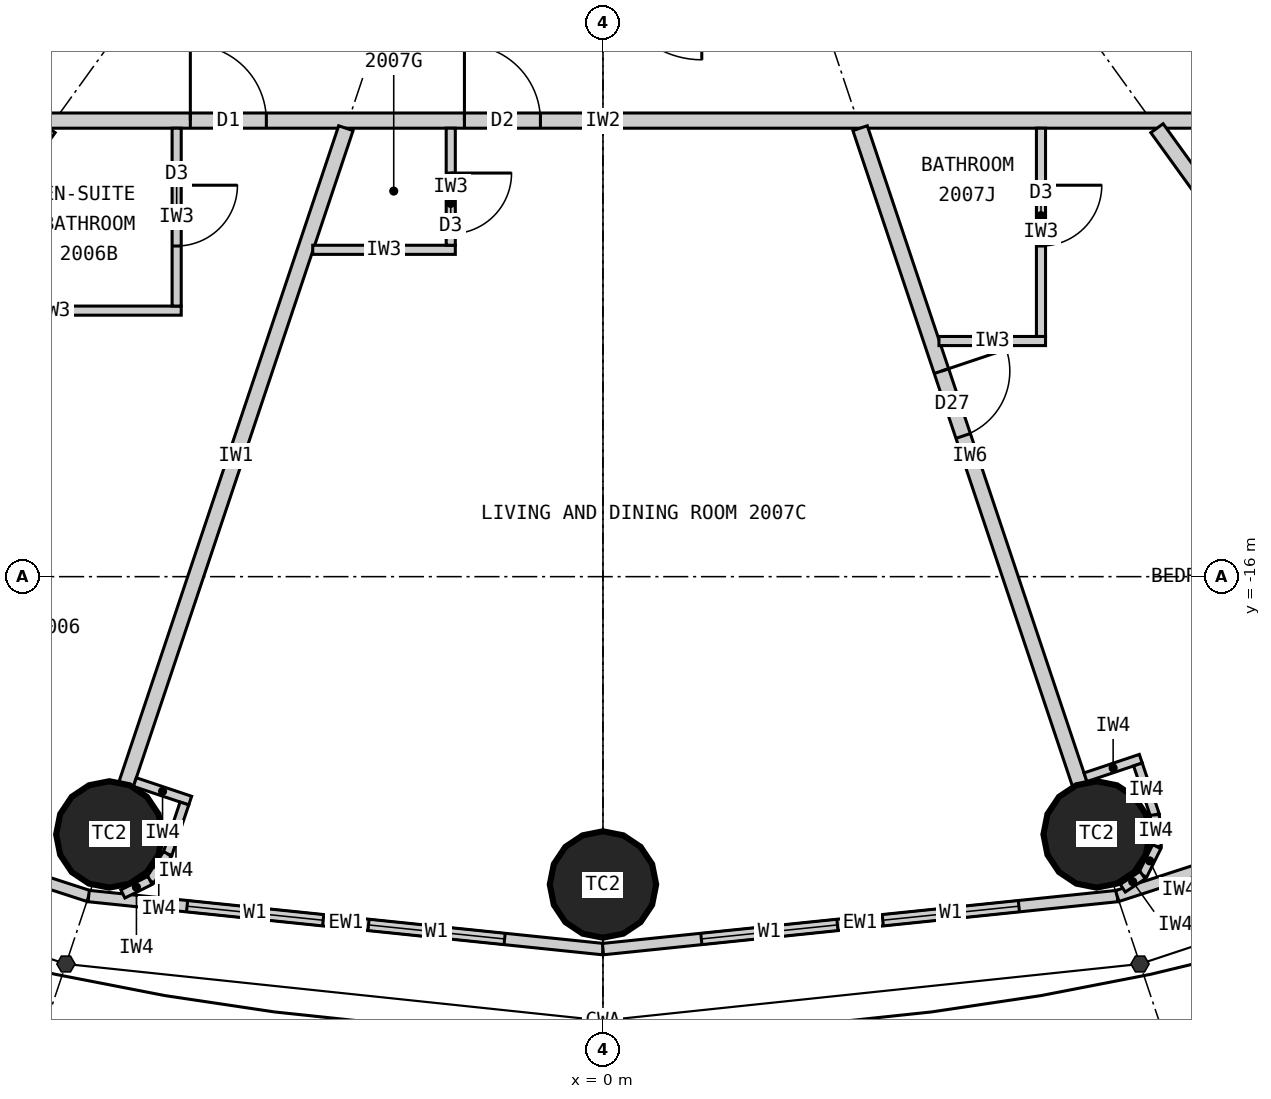
"""IFC4 building model, lengths in metres.
Left out: names, types, materials, properties, quantities, classifications, styles, units other than length and angle.
Written with IfcOpenShell. Run it as: python <this file> out.ifc"""

import sys

from ifc_helpers import new_model, si_unit, direction, frame, frame_2d, origin, origin_2d, place, context, subcontext, project, spatial, rectangle, circle, extrude, element, fill, save


model = new_model("IFC4")
c1 = context("Model", 3, precision=1e-05, world=origin(), true_north=direction((0.0, 1.0)))
c2 = subcontext(c1, "Body", "Model", "MODEL_VIEW")
j1 = project(units=[si_unit("LENGTHUNIT", "METRE"), si_unit("PLANEANGLEUNIT", "RADIAN")], contexts=[c1])
p1 = place(None, origin())
s1 = spatial("IfcSite", under=j1, at=p1, CompositionType="ELEMENT")
p2 = place(p1, origin())
s2 = spatial("IfcBuilding", under=s1, at=p2, CompositionType="ELEMENT")
p3 = place(p2, frame((0.0, 0.0, 80.4)))
s3 = spatial("IfcBuildingStorey", under=s2, at=p3, CompositionType="ELEMENT", Elevation=80.4)
for number, where, z_axis, x_axis in (
    (1, (-6.495, -19.391, 0.0), (0.0, 0.0, 1.0), (1.0, 0.0, 0.0)),
    (2, (0.0, -20.05, 0.0), (0.0, 0.0, 1.0), (1.0, 0.0, 0.0)),
    (3, (6.495, -19.391, 0.0), (0.0, 0.0, 1.0), (1.0, 0.0, 0.0)),
):
    element("IfcColumn", number, at=place(p3, frame(where, z_axis=z_axis, x_axis=x_axis)), inside=s3, PredefinedType="COLUMN", context=c2, shape_type="SweptSolid", body=[
        extrude(circle(Radius=0.7, at=origin_2d()), origin(), (0.0, 0.0, 1.0), 3.3),
    ])
p4 = place(p3, frame((-13.096, -18.147, 0.0), z_axis=(0.0, 0.0, 1.0), x_axis=(0.951137534625, -0.308767534285, 0.0)))
e4 = element("IfcWall", 4, at=p4, inside=s3, PredefinedType="ELEMENTEDWALL", context=c2, shape_type="SweptSolid", body=[
    extrude(rectangle(XDim=6.655, YDim=0.15, at=frame_2d((3.328, 0.0))), origin(), (0.0, 0.0, 1.0), 3.12),
])
p5 = place(p4, frame((1.228, 0.0, 0.9)))
e5 = element("IfcOpeningElement", 5, at=p5, cuts=e4, PredefinedType="OPENING", context=c2, shape_type="SweptSolid", body=[
    extrude(rectangle(XDim=1.8, YDim=1.9, at=frame_2d((0.9, 0.95))), frame((0.0, 0.085, 0.0), z_axis=(0.0, -1.0, 0.0), x_axis=(1.0, 0.0, 0.0)), (0.0, 0.0, 1.0), 0.17),
])
p6 = place(p4, frame((3.628, 0.0, 0.9)))
e6 = element("IfcOpeningElement", 6, at=p6, cuts=e4, PredefinedType="OPENING", context=c2, shape_type="SweptSolid", body=[
    extrude(rectangle(XDim=1.8, YDim=1.9, at=frame_2d((0.9, 0.95))), frame((0.0, 0.085, 0.0), z_axis=(0.0, -1.0, 0.0), x_axis=(1.0, 0.0, 0.0)), (0.0, 0.0, 1.0), 0.17),
])
p7 = place(p3, frame((-6.766, -20.202, 0.0), z_axis=(0.0, 0.0, 1.0), x_axis=(0.994721394369, -0.102612609291, 0.0)))
e7 = element("IfcWall", 7, at=p7, inside=s3, PredefinedType="ELEMENTEDWALL", context=c2, shape_type="SweptSolid", body=[
    extrude(rectangle(XDim=6.802, YDim=0.15, at=frame_2d((3.401, 0.0))), origin(), (0.0, 0.0, 1.0), 3.12),
])
p8 = place(p7, frame((1.301, 0.0, 0.9)))
e8 = element("IfcOpeningElement", 8, at=p8, cuts=e7, PredefinedType="OPENING", context=c2, shape_type="SweptSolid", body=[
    extrude(rectangle(XDim=1.8, YDim=1.9, at=frame_2d((0.9, 0.95))), frame((0.0, 0.085, 0.0), z_axis=(0.0, -1.0, 0.0), x_axis=(1.0, 0.0, 0.0)), (0.0, 0.0, 1.0), 0.17),
])
p9 = place(p7, frame((3.701, 0.0, 0.9)))
e9 = element("IfcOpeningElement", 9, at=p9, cuts=e7, PredefinedType="OPENING", context=c2, shape_type="SweptSolid", body=[
    extrude(rectangle(XDim=1.8, YDim=1.9, at=frame_2d((0.9, 0.95))), frame((0.0, 0.085, 0.0), z_axis=(0.0, -1.0, 0.0), x_axis=(1.0, 0.0, 0.0)), (0.0, 0.0, 1.0), 0.17),
])
p10 = place(p3, frame((0.0, -20.9, 0.0), z_axis=(0.0, 0.0, 1.0), x_axis=(0.994721394369, 0.102612609291, 0.0)))
e10 = element("IfcWall", 10, at=p10, inside=s3, PredefinedType="ELEMENTEDWALL", context=c2, shape_type="SweptSolid", body=[
    extrude(rectangle(XDim=6.802, YDim=0.15, at=frame_2d((3.401, 0.0))), origin(), (0.0, 0.0, 1.0), 3.12),
])
p11 = place(p10, frame((1.301, 0.0, 0.9)))
e11 = element("IfcOpeningElement", 11, at=p11, cuts=e10, PredefinedType="OPENING", context=c2, shape_type="SweptSolid", body=[
    extrude(rectangle(XDim=1.8, YDim=1.9, at=frame_2d((0.9, 0.95))), frame((0.0, 0.085, 0.0), z_axis=(0.0, -1.0, 0.0), x_axis=(1.0, 0.0, 0.0)), (0.0, 0.0, 1.0), 0.17),
])
p12 = place(p10, frame((3.701, 0.0, 0.9)))
e12 = element("IfcOpeningElement", 12, at=p12, cuts=e10, PredefinedType="OPENING", context=c2, shape_type="SweptSolid", body=[
    extrude(rectangle(XDim=1.8, YDim=1.9, at=frame_2d((0.9, 0.95))), frame((0.0, 0.085, 0.0), z_axis=(0.0, -1.0, 0.0), x_axis=(1.0, 0.0, 0.0)), (0.0, 0.0, 1.0), 0.17),
])
p13 = place(p3, frame((6.766, -20.202, 0.0), z_axis=(0.0, 0.0, 1.0), x_axis=(0.951137534625, 0.308767534285, 0.0)))
e13 = element("IfcWall", 13, at=p13, inside=s3, PredefinedType="ELEMENTEDWALL", context=c2, shape_type="SweptSolid", body=[
    extrude(rectangle(XDim=6.655, YDim=0.15, at=frame_2d((3.328, 0.0))), origin(), (0.0, 0.0, 1.0), 3.12),
])
p14 = place(p13, frame((1.228, 0.0, 0.9)))
e14 = element("IfcOpeningElement", 14, at=p14, cuts=e13, PredefinedType="OPENING", context=c2, shape_type="SweptSolid", body=[
    extrude(rectangle(XDim=1.8, YDim=1.9, at=frame_2d((0.9, 0.95))), frame((0.0, 0.085, 0.0), z_axis=(0.0, -1.0, 0.0), x_axis=(1.0, 0.0, 0.0)), (0.0, 0.0, 1.0), 0.17),
])
p15 = place(p13, frame((3.628, 0.0, 0.9)))
e15 = element("IfcOpeningElement", 15, at=p15, cuts=e13, PredefinedType="OPENING", context=c2, shape_type="SweptSolid", body=[
    extrude(rectangle(XDim=1.8, YDim=1.9, at=frame_2d((0.9, 0.95))), frame((0.0, 0.085, 0.0), z_axis=(0.0, -1.0, 0.0), x_axis=(1.0, 0.0, 0.0)), (0.0, 0.0, 1.0), 0.17),
])
p16 = place(p3, frame((14.1, -10.0, 0.0), z_axis=(0.0, 0.0, 1.0), x_axis=(-1.0, 0.0, 0.0)))
e16 = element("IfcWall", 16, at=p16, inside=s3, PredefinedType="PARTITIONING", context=c2, shape_type="SweptSolid", body=[
    extrude(rectangle(XDim=28.2, YDim=0.2, at=frame_2d((14.1, 0.0))), origin(), (0.0, 0.0, 1.0), 3.12),
])
p17 = place(p16, frame((23.865, 0.0, 0.0)))
e17 = element("IfcOpeningElement", 17, at=p17, cuts=e16, PredefinedType="OPENING", context=c2, shape_type="SweptSolid", body=[
    extrude(rectangle(XDim=1.0, YDim=2.2, at=frame_2d((0.5, 1.1))), frame((0.0, 0.11, 0.0), z_axis=(0.0, -1.0, 0.0), x_axis=(1.0, 0.0, 0.0)), (0.0, 0.0, 1.0), 0.22),
])
p18 = place(p16, frame((18.529, 0.0, 0.0)))
e18 = element("IfcOpeningElement", 18, at=p18, cuts=e16, PredefinedType="OPENING", context=c2, shape_type="SweptSolid", body=[
    extrude(rectangle(XDim=1.0, YDim=2.2, at=frame_2d((0.5, 1.1))), frame((0.0, 0.11, 0.0), z_axis=(0.0, -1.0, 0.0), x_axis=(1.0, 0.0, 0.0)), (0.0, 0.0, 1.0), 0.22),
])
p19 = place(p16, frame((14.923, 0.0, 0.0)))
e19 = element("IfcOpeningElement", 19, at=p19, cuts=e16, PredefinedType="OPENING", context=c2, shape_type="SweptSolid", body=[
    extrude(rectangle(XDim=1.0, YDim=2.2, at=frame_2d((0.5, 1.1))), frame((0.0, 0.11, 0.0), z_axis=(0.0, -1.0, 0.0), x_axis=(1.0, 0.0, 0.0)), (0.0, 0.0, 1.0), 0.22),
])
p20 = place(p16, frame((2.801, 0.0, 0.0)))
e20 = element("IfcOpeningElement", 20, at=p20, cuts=e16, PredefinedType="OPENING", context=c2, shape_type="SweptSolid", body=[
    extrude(rectangle(XDim=1.0, YDim=2.2, at=frame_2d((0.5, 1.1))), frame((0.0, 0.11, 0.0), z_axis=(0.0, -1.0, 0.0), x_axis=(1.0, 0.0, 0.0)), (0.0, 0.0, 1.0), 0.22),
])
p21 = place(p3, frame((-7.289, -10.1, 0.0), z_axis=(0.0, 0.0, 1.0), x_axis=(-0.585198353053, -0.810890182197, 0.0)))
e21 = element("IfcWall", 21, at=p21, inside=s3, PredefinedType="PARTITIONING", context=c2, shape_type="SweptSolid", body=[
    extrude(rectangle(XDim=8.36, YDim=0.2, at=frame_2d((4.18, 0.0))), origin(), (0.0, 0.0, 1.0), 2.32),
])
p22 = place(p3, frame((-3.383, -10.1, 0.0), z_axis=(0.0, 0.0, 1.0), x_axis=(-0.31759592231, -0.948226149256, 0.0)))
e22 = element("IfcWall", 22, at=p22, inside=s3, PredefinedType="PARTITIONING", context=c2, shape_type="SweptSolid", body=[
    extrude(rectangle(XDim=9.098, YDim=0.2, at=frame_2d((4.549, 0.0))), origin(), (0.0, 0.0, 1.0), 2.32),
])
p23 = place(p3, frame((3.383, -10.1, 0.0), z_axis=(0.0, 0.0, 1.0), x_axis=(0.31759592231, -0.948226149256, 0.0)))
e23 = element("IfcWall", 23, at=p23, inside=s3, PredefinedType="PARTITIONING", context=c2, shape_type="SweptSolid", body=[
    extrude(rectangle(XDim=9.098, YDim=0.2, at=frame_2d((4.549, 0.0))), origin(), (0.0, 0.0, 1.0), 2.32),
])
p24 = place(p23, frame((3.37, 0.0, 0.0)))
e24 = element("IfcOpeningElement", 24, at=p24, cuts=e23, PredefinedType="OPENING", context=c2, shape_type="SweptSolid", body=[
    extrude(rectangle(XDim=0.9, YDim=2.1, at=frame_2d((0.45, 1.05))), frame((0.0, 0.11, 0.0), z_axis=(0.0, -1.0, 0.0), x_axis=(1.0, 0.0, 0.0)), (0.0, 0.0, 1.0), 0.22),
])
p25 = place(p3, frame((7.289, -10.1, 0.0), z_axis=(0.0, 0.0, 1.0), x_axis=(0.585198353053, -0.810890182197, 0.0)))
e25 = element("IfcWall", 25, at=p25, inside=s3, PredefinedType="PARTITIONING", context=c2, shape_type="SweptSolid", body=[
    extrude(rectangle(XDim=8.36, YDim=0.2, at=frame_2d((4.18, 0.0))), origin(), (0.0, 0.0, 1.0), 2.32),
])
p26 = place(p3, frame((-8.921, -12.5, 0.0), z_axis=(0.0, 0.0, 1.0), x_axis=(1.0, 0.0, 0.0)))
e26 = element("IfcWall", 26, at=p26, inside=s3, PredefinedType="PARTITIONING", context=c2, shape_type="SweptSolid", body=[
    extrude(rectangle(XDim=3.372, YDim=0.12, at=frame_2d((1.686, 0.0))), origin(), (0.0, 0.0, 1.0), 3.12),
])
p27 = place(p3, frame((-5.609, -10.1, 0.0), z_axis=(0.0, 0.0, 1.0), x_axis=(0.0, -1.0, 0.0)))
e27 = element("IfcWall", 27, at=p27, inside=s3, PredefinedType="PARTITIONING", context=c2, shape_type="SweptSolid", body=[
    extrude(rectangle(XDim=2.34, YDim=0.12, at=frame_2d((1.17, 0.0))), origin(), (0.0, 0.0, 1.0), 3.12),
])
p28 = place(p27, frame((0.75, 0.0, 0.0)))
e28 = element("IfcOpeningElement", 28, at=p28, cuts=e27, PredefinedType="OPENING", context=c2, shape_type="SweptSolid", body=[
    extrude(rectangle(XDim=0.8, YDim=2.1, at=frame_2d((0.4, 1.05))), frame((0.0, 0.07, 0.0), z_axis=(0.0, -1.0, 0.0), x_axis=(1.0, 0.0, 0.0)), (0.0, 0.0, 1.0), 0.14),
])
p29 = place(p3, frame((-3.819, -11.7, 0.0), z_axis=(0.0, 0.0, 1.0), x_axis=(1.0, 0.0, 0.0)))
e29 = element("IfcWall", 29, at=p29, inside=s3, PredefinedType="PARTITIONING", context=c2, shape_type="SweptSolid", body=[
    extrude(rectangle(XDim=1.876, YDim=0.12, at=frame_2d((0.938, 0.0))), origin(), (0.0, 0.0, 1.0), 3.12),
])
p30 = place(p3, frame((-2.003, -10.1, 0.0), z_axis=(0.0, 0.0, 1.0), x_axis=(0.0, -1.0, 0.0)))
e30 = element("IfcWall", 30, at=p30, inside=s3, PredefinedType="PARTITIONING", context=c2, shape_type="SweptSolid", body=[
    extrude(rectangle(XDim=1.54, YDim=0.12, at=frame_2d((0.77, 0.0))), origin(), (0.0, 0.0, 1.0), 3.12),
])
p31 = place(p30, frame((0.59, 0.0, 0.0)))
e31 = element("IfcOpeningElement", 31, at=p31, cuts=e30, PredefinedType="OPENING", context=c2, shape_type="SweptSolid", body=[
    extrude(rectangle(XDim=0.8, YDim=2.1, at=frame_2d((0.4, 1.05))), frame((0.0, 0.07, 0.0), z_axis=(0.0, -1.0, 0.0), x_axis=(1.0, 0.0, 0.0)), (0.0, 0.0, 1.0), 0.14),
])
p32 = place(p3, frame((4.421, -12.9, 0.0), z_axis=(0.0, 0.0, 1.0), x_axis=(1.0, 0.0, 0.0)))
e32 = element("IfcWall", 32, at=p32, inside=s3, PredefinedType="PARTITIONING", context=c2, shape_type="SweptSolid", body=[
    extrude(rectangle(XDim=1.402, YDim=0.12, at=frame_2d((0.701, 0.0))), origin(), (0.0, 0.0, 1.0), 3.12),
])
p33 = place(p3, frame((5.763, -10.1, 0.0), z_axis=(0.0, 0.0, 1.0), x_axis=(0.0, -1.0, 0.0)))
e33 = element("IfcWall", 33, at=p33, inside=s3, PredefinedType="PARTITIONING", context=c2, shape_type="SweptSolid", body=[
    extrude(rectangle(XDim=2.74, YDim=0.12, at=frame_2d((1.37, 0.0))), origin(), (0.0, 0.0, 1.0), 3.12),
])
p34 = place(p33, frame((0.75, 0.0, 0.0)))
e34 = element("IfcOpeningElement", 34, at=p34, cuts=e33, PredefinedType="OPENING", context=c2, shape_type="SweptSolid", body=[
    extrude(rectangle(XDim=0.8, YDim=2.1, at=frame_2d((0.4, 1.05))), frame((0.0, 0.07, 0.0), z_axis=(0.0, -1.0, 0.0), x_axis=(1.0, 0.0, 0.0)), (0.0, 0.0, 1.0), 0.14),
])
p35 = place(p3, frame((-6.159, -18.702, 0.0), z_axis=(0.0, 0.0, 1.0), x_axis=(0.948173154049, -0.31775410295, 0.0)))
e35 = element("IfcWall", 35, at=p35, inside=s3, PredefinedType="PARTITIONING", context=c2, shape_type="SweptSolid", body=[
    extrude(rectangle(XDim=0.768, YDim=0.12, at=frame_2d((0.384, 0.0))), origin(), (0.0, 0.0, 1.0), 3.12),
])
p36 = place(p3, frame((-5.507, -18.984, 0.0), z_axis=(0.0, 0.0, 1.0), x_axis=(-0.317692050622, -0.948193946918, 0.0)))
e36 = element("IfcWall", 36, at=p36, inside=s3, PredefinedType="PARTITIONING", context=c2, shape_type="SweptSolid", body=[
    extrude(rectangle(XDim=0.7, YDim=0.12, at=frame_2d((0.35, 0.0))), origin(), (0.0, 0.0, 1.0), 3.12),
])
p37 = place(p3, frame((-5.729, -19.648, 0.0), z_axis=(0.0, 0.0, 1.0), x_axis=(-0.552135764955, -0.833754218615, 0.0)))
e37 = element("IfcWall", 37, at=p37, inside=s3, PredefinedType="PARTITIONING", context=c2, shape_type="SweptSolid", body=[
    extrude(rectangle(XDim=0.418, YDim=0.12, at=frame_2d((0.209, 0.0))), origin(), (0.0, 0.0, 1.0), 3.12),
])
p38 = place(p3, frame((-5.96, -19.996, 0.0), z_axis=(0.0, 0.0, 1.0), x_axis=(-0.895160725913, -0.445743507842, 0.0)))
e38 = element("IfcWall", 38, at=p38, inside=s3, PredefinedType="PARTITIONING", context=c2, shape_type="SweptSolid", body=[
    extrude(rectangle(XDim=0.399, YDim=0.12, at=frame_2d((0.199, 0.0))), origin(), (0.0, 0.0, 1.0), 3.12),
])
p39 = place(p3, frame((6.348, -18.639, 0.0), z_axis=(0.0, 0.0, 1.0), x_axis=(0.948268951266, 0.317468102437, 0.0)))
e39 = element("IfcWall", 39, at=p39, inside=s3, PredefinedType="PARTITIONING", context=c2, shape_type="SweptSolid", body=[
    extrude(rectangle(XDim=0.768, YDim=0.12, at=frame_2d((0.384, 0.0))), origin(), (0.0, 0.0, 1.0), 3.12),
])
p40 = place(p3, frame((7.038, -18.471, 0.0), z_axis=(0.0, 0.0, 1.0), x_axis=(0.317378466199, -0.9482989556, 0.0)))
e40 = element("IfcWall", 40, at=p40, inside=s3, PredefinedType="PARTITIONING", context=c2, shape_type="SweptSolid", body=[
    extrude(rectangle(XDim=0.7, YDim=0.12, at=frame_2d((0.35, 0.0))), origin(), (0.0, 0.0, 1.0), 3.12),
])
p41 = place(p3, frame((7.26, -19.135, 0.0), z_axis=(0.0, 0.0, 1.0), x_axis=(0.0613238046, -0.99811792439, 0.0)))
e41 = element("IfcWall", 41, at=p41, inside=s3, PredefinedType="PARTITIONING", context=c2, shape_type="SweptSolid", body=[
    extrude(rectangle(XDim=0.418, YDim=0.12, at=frame_2d((0.209, 0.0))), origin(), (0.0, 0.0, 1.0), 3.12),
])
p42 = place(p3, frame((7.286, -19.552, 0.0), z_axis=(0.0, 0.0, 1.0), x_axis=(-0.445810757773, -0.89512723579, 0.0)))
e42 = element("IfcWall", 42, at=p42, inside=s3, PredefinedType="PARTITIONING", context=c2, shape_type="SweptSolid", body=[
    extrude(rectangle(XDim=0.418, YDim=0.12, at=frame_2d((0.209, 0.0))), origin(), (0.0, 0.0, 1.0), 3.12),
])
p43 = place(p3, frame((7.1, -19.926, 0.0), z_axis=(0.0, 0.0, 1.0), x_axis=(-0.833488262509, -0.552537162787, 0.0)))
e43 = element("IfcWall", 43, at=p43, inside=s3, PredefinedType="PARTITIONING", context=c2, shape_type="SweptSolid", body=[
    extrude(rectangle(XDim=0.313, YDim=0.12, at=frame_2d((0.156, 0.0))), origin(), (0.0, 0.0, 1.0), 3.12),
])
p44 = place(p8, origin())
e44 = element("IfcWindow", 44, at=p44, inside=s3, PartitioningType="SINGLE_PANEL", PredefinedType="WINDOW", context=c2, shape_type="SweptSolid", body=[
    extrude(rectangle(XDim=1.8, YDim=1.9, at=frame_2d((0.9, 0.95))), frame((0.0, 0.03, 0.0), z_axis=(0.0, -1.0, 0.0), x_axis=(1.0, 0.0, 0.0)), (0.0, 0.0, 1.0), 0.06),
])
fill(e8, e44)
p45 = place(p9, origin())
e45 = element("IfcWindow", 45, at=p45, inside=s3, PartitioningType="SINGLE_PANEL", PredefinedType="WINDOW", context=c2, shape_type="SweptSolid", body=[
    extrude(rectangle(XDim=1.8, YDim=1.9, at=frame_2d((0.9, 0.95))), frame((0.0, 0.03, 0.0), z_axis=(0.0, -1.0, 0.0), x_axis=(1.0, 0.0, 0.0)), (0.0, 0.0, 1.0), 0.06),
])
fill(e9, e45)
p46 = place(p11, origin())
e46 = element("IfcWindow", 46, at=p46, inside=s3, PartitioningType="SINGLE_PANEL", PredefinedType="WINDOW", context=c2, shape_type="SweptSolid", body=[
    extrude(rectangle(XDim=1.8, YDim=1.9, at=frame_2d((0.9, 0.95))), frame((0.0, 0.03, 0.0), z_axis=(0.0, -1.0, 0.0), x_axis=(1.0, 0.0, 0.0)), (0.0, 0.0, 1.0), 0.06),
])
fill(e11, e46)
p47 = place(p12, origin())
e47 = element("IfcWindow", 47, at=p47, inside=s3, PartitioningType="SINGLE_PANEL", PredefinedType="WINDOW", context=c2, shape_type="SweptSolid", body=[
    extrude(rectangle(XDim=1.8, YDim=1.9, at=frame_2d((0.9, 0.95))), frame((0.0, 0.03, 0.0), z_axis=(0.0, -1.0, 0.0), x_axis=(1.0, 0.0, 0.0)), (0.0, 0.0, 1.0), 0.06),
])
fill(e12, e47)
p48 = place(p28, origin())
e48 = element("IfcDoor", 48, at=p48, inside=s3, OperationType="SINGLE_SWING_LEFT", PredefinedType="DOOR", context=c2, shape_type="SweptSolid", body=[
    extrude(rectangle(XDim=0.8, YDim=2.1, at=frame_2d((0.4, 1.05))), frame((0.0, 0.025, 0.0), z_axis=(0.0, -1.0, 0.0), x_axis=(1.0, 0.0, 0.0)), (0.0, 0.0, 1.0), 0.05),
])
fill(e28, e48)
p49 = place(p18, origin())
e49 = element("IfcDoor", 49, at=p49, inside=s3, OperationType="SINGLE_SWING_RIGHT", PredefinedType="DOOR", context=c2, shape_type="SweptSolid", body=[
    extrude(rectangle(XDim=1.0, YDim=2.2, at=frame_2d((0.5, 1.1))), frame((0.0, 0.025, 0.0), z_axis=(0.0, -1.0, 0.0), x_axis=(1.0, 0.0, 0.0)), (0.0, 0.0, 1.0), 0.05),
])
fill(e18, e49)
p50 = place(p31, origin())
e50 = element("IfcDoor", 50, at=p50, inside=s3, OperationType="SINGLE_SWING_LEFT", PredefinedType="DOOR", context=c2, shape_type="SweptSolid", body=[
    extrude(rectangle(XDim=0.8, YDim=2.1, at=frame_2d((0.4, 1.05))), frame((0.0, 0.025, 0.0), z_axis=(0.0, -1.0, 0.0), x_axis=(1.0, 0.0, 0.0)), (0.0, 0.0, 1.0), 0.05),
])
fill(e31, e50)
p51 = place(p19, origin())
e51 = element("IfcDoor", 51, at=p51, inside=s3, OperationType="SINGLE_SWING_RIGHT", PredefinedType="DOOR", context=c2, shape_type="SweptSolid", body=[
    extrude(rectangle(XDim=1.0, YDim=2.2, at=frame_2d((0.5, 1.1))), frame((0.0, 0.025, 0.0), z_axis=(0.0, -1.0, 0.0), x_axis=(1.0, 0.0, 0.0)), (0.0, 0.0, 1.0), 0.05),
])
fill(e19, e51)
p52 = place(p34, origin())
e52 = element("IfcDoor", 52, at=p52, inside=s3, OperationType="SINGLE_SWING_LEFT", PredefinedType="DOOR", context=c2, shape_type="SweptSolid", body=[
    extrude(rectangle(XDim=0.8, YDim=2.1, at=frame_2d((0.4, 1.05))), frame((0.0, 0.025, 0.0), z_axis=(0.0, -1.0, 0.0), x_axis=(1.0, 0.0, 0.0)), (0.0, 0.0, 1.0), 0.05),
])
fill(e34, e52)
p53 = place(p24, origin())
e53 = element("IfcDoor", 53, at=p53, inside=s3, OperationType="SINGLE_SWING_LEFT", PredefinedType="DOOR", context=c2, shape_type="SweptSolid", body=[
    extrude(rectangle(XDim=0.9, YDim=2.1, at=frame_2d((0.45, 1.05))), frame((0.0, 0.025, 0.0), z_axis=(0.0, -1.0, 0.0), x_axis=(1.0, 0.0, 0.0)), (0.0, 0.0, 1.0), 0.05),
])
fill(e24, e53)
save(model, sys.argv[1])
